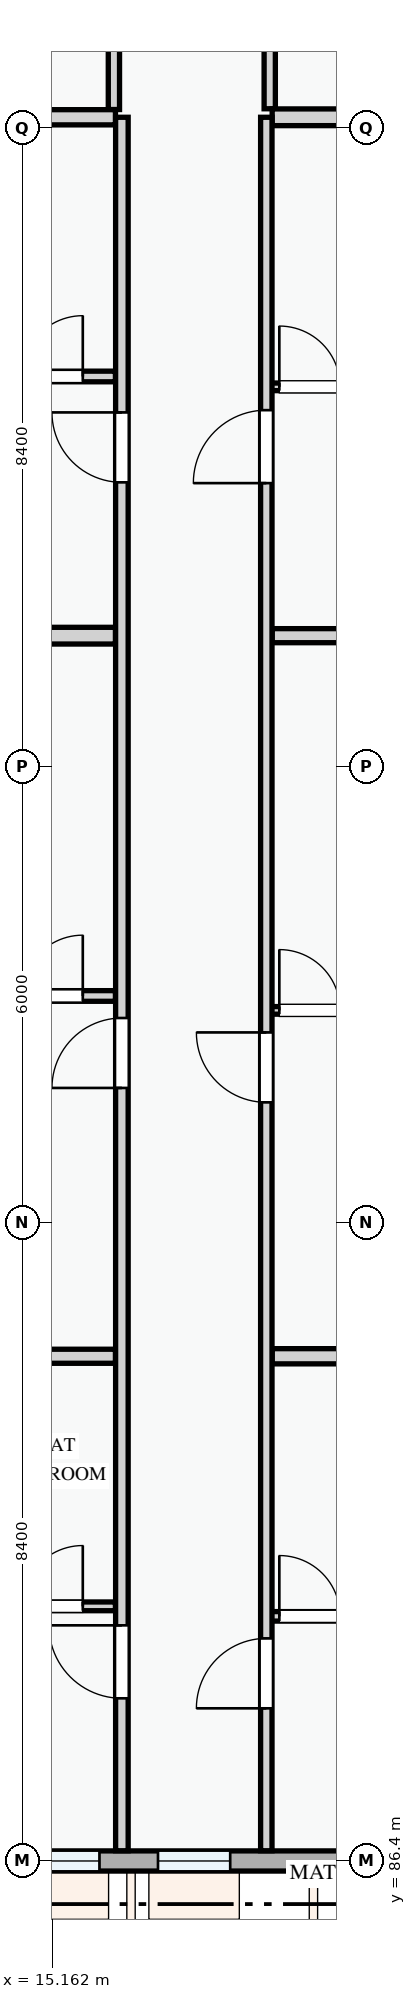
"""IFC4 building model, lengths in metres.
Left out: names, types, materials, properties, quantities, classifications, styles, units other than length and angle.
Written with IfcOpenShell. Run it as: python <this file> out.ifc"""

import sys

from ifc_helpers import new_model, si_unit, direction, frame, frame_2d, origin, place, context, subcontext, project, spatial, rectangle, extrude, element, fill, save


model = new_model("IFC4")
c1 = context("Model", 3, precision=1e-05, world=origin(), true_north=direction((0.0, 1.0)))
c2 = subcontext(c1, "Body", "Model", "MODEL_VIEW")
j1 = project(units=[si_unit("LENGTHUNIT", "METRE"), si_unit("PLANEANGLEUNIT", "RADIAN")], contexts=[c1])
p1 = place(None, origin())
s1 = spatial("IfcSite", under=j1, at=p1, CompositionType="ELEMENT")
p2 = place(p1, origin())
s2 = spatial("IfcBuilding", under=s1, at=p2, CompositionType="ELEMENT")
p3 = place(p2, frame((0.0, 0.0, 34.5)))
s3 = spatial("IfcBuildingStorey", under=s2, at=p3, CompositionType="ELEMENT", Elevation=34.5)
p4 = place(p3, frame((14.4, 86.4, 0.0), z_axis=(0.0, 0.0, 1.0), x_axis=(1.0, 0.0, 0.0)))
e1 = element("IfcWall", 1, at=p4, inside=s3, PredefinedType="STANDARD", context=c2, shape_type="SweptSolid", body=[
    extrude(rectangle(XDim=8.4, YDim=0.265, at=frame_2d((4.2, 0.0))), origin(), (0.0, 0.0, 1.0), 2.375),
])
p5 = place(p4, frame((0.485, 0.0, 0.78)))
e2 = element("IfcOpeningElement", 2, at=p5, cuts=e1, PredefinedType="OPENING", context=c2, shape_type="SweptSolid", body=[
    extrude(rectangle(XDim=0.9, YDim=1.2, at=frame_2d((0.45, 0.6))), frame((0.0, 0.143, 0.0), z_axis=(0.0, -1.0, 0.0), x_axis=(1.0, 0.0, 0.0)), (0.0, 0.0, 1.0), 0.285),
])
p6 = place(p4, frame((2.155, 0.0, 0.78)))
e3 = element("IfcOpeningElement", 3, at=p6, cuts=e1, PredefinedType="OPENING", context=c2, shape_type="SweptSolid", body=[
    extrude(rectangle(XDim=0.95, YDim=1.15, at=frame_2d((0.475, 0.575))), frame((0.0, 0.143, 0.0), z_axis=(0.0, -1.0, 0.0), x_axis=(1.0, 0.0, 0.0)), (0.0, 0.0, 1.0), 0.285),
])
p7 = place(p4, frame((5.185, 0.0, 0.78)))
e4 = element("IfcOpeningElement", 4, at=p7, cuts=e1, PredefinedType="OPENING", context=c2, shape_type="SweptSolid", body=[
    extrude(rectangle(XDim=1.42, YDim=1.38, at=frame_2d((0.71, 0.69))), frame((0.0, 0.143, 0.0), z_axis=(0.0, -1.0, 0.0), x_axis=(1.0, 0.0, 0.0)), (0.0, 0.0, 1.0), 0.285),
])
p8 = place(p3, frame((15.975, 113.324, 0.0), z_axis=(0.0, 0.0, 1.0), x_axis=(0.0, -1.0, 0.0)))
e5 = element("IfcWall", 5, at=p8, inside=s3, PredefinedType="PARTITIONING", context=c2, shape_type="SweptSolid", body=[
    extrude(rectangle(XDim=3.882, YDim=0.148, at=frame_2d((1.941, 0.0))), origin(), (0.0, 0.0, 1.0), 3.0),
])
p9 = place(p3, frame((18.025, 113.324, 0.0), z_axis=(0.0, 0.0, 1.0), x_axis=(0.0, -1.0, 0.0)))
e6 = element("IfcWall", 6, at=p9, inside=s3, PredefinedType="PARTITIONING", context=c2, shape_type="SweptSolid", body=[
    extrude(rectangle(XDim=3.872, YDim=0.148, at=frame_2d((1.936, 0.0))), origin(), (0.0, 0.0, 1.0), 3.0),
])
p10 = place(p3, frame((8.534, 89.75, 0.0), z_axis=(0.0, 0.0, 1.0), x_axis=(1.0, 0.0, 0.0)))
e7 = element("IfcWall", 7, at=p10, inside=s3, PredefinedType="PARTITIONING", context=c2, shape_type="SweptSolid", body=[
    extrude(rectangle(XDim=7.461, YDim=0.115, at=frame_2d((3.73, 0.0))), origin(), (0.0, 0.0, 1.0), 3.0),
])
p11 = place(p10, frame((1.329, 0.0, 0.0)))
e8 = element("IfcOpeningElement", 8, at=p11, cuts=e7, PredefinedType="OPENING", context=c2, shape_type="SweptSolid", body=[
    extrude(rectangle(XDim=0.85, YDim=2.1, at=frame_2d((0.425, 1.05))), frame((0.0, 0.067, 0.0), z_axis=(0.0, -1.0, 0.0), x_axis=(1.0, 0.0, 0.0)), (0.0, 0.0, 1.0), 0.135),
])
p12 = place(p10, frame((4.225, 0.0, 0.0)))
e9 = element("IfcOpeningElement", 9, at=p12, cuts=e7, PredefinedType="OPENING", context=c2, shape_type="SweptSolid", body=[
    extrude(rectangle(XDim=0.85, YDim=2.1, at=frame_2d((0.425, 1.05))), frame((0.0, 0.067, 0.0), z_axis=(0.0, -1.0, 0.0), x_axis=(1.0, 0.0, 0.0)), (0.0, 0.0, 1.0), 0.135),
])
p13 = place(p10, frame((6.231, 0.0, 0.0)))
e10 = element("IfcOpeningElement", 10, at=p13, cuts=e7, PredefinedType="OPENING", context=c2, shape_type="SweptSolid", body=[
    extrude(rectangle(XDim=0.8, YDim=2.1, at=frame_2d((0.4, 1.05))), frame((0.0, 0.067, 0.0), z_axis=(0.0, -1.0, 0.0), x_axis=(1.0, 0.0, 0.0)), (0.0, 0.0, 1.0), 0.135),
])
p14 = place(p3, frame((17.98, 89.618, 0.0), z_axis=(0.0, 0.0, 1.0), x_axis=(1.0, 0.0, 0.0)))
e11 = element("IfcWall", 11, at=p14, inside=s3, PredefinedType="PARTITIONING", context=c2, shape_type="SweptSolid", body=[
    extrude(rectangle(XDim=4.686, YDim=0.125, at=frame_2d((2.343, 0.0))), origin(), (0.0, 0.0, 1.0), 3.0),
])
p15 = place(p14, frame((0.171, 0.0, 0.0)))
e12 = element("IfcOpeningElement", 12, at=p15, cuts=e11, PredefinedType="OPENING", context=c2, shape_type="SweptSolid", body=[
    extrude(rectangle(XDim=0.8, YDim=2.1, at=frame_2d((0.4, 1.05))), frame((0.0, 0.073, 0.0), z_axis=(0.0, -1.0, 0.0), x_axis=(1.0, 0.0, 0.0)), (0.0, 0.0, 1.0), 0.145),
])
p16 = place(p14, frame((1.384, 0.0, 0.0)))
e13 = element("IfcOpeningElement", 13, at=p16, cuts=e11, PredefinedType="OPENING", context=c2, shape_type="SweptSolid", body=[
    extrude(rectangle(XDim=0.85, YDim=2.1, at=frame_2d((0.425, 1.05))), frame((0.0, 0.073, 0.0), z_axis=(0.0, -1.0, 0.0), x_axis=(1.0, 0.0, 0.0)), (0.0, 0.0, 1.0), 0.145),
])
p17 = place(p14, frame((3.193, 0.0, 0.0)))
e14 = element("IfcOpeningElement", 14, at=p17, cuts=e11, PredefinedType="OPENING", context=c2, shape_type="SweptSolid", body=[
    extrude(rectangle(XDim=0.85, YDim=2.1, at=frame_2d((0.425, 1.05))), frame((0.0, 0.073, 0.0), z_axis=(0.0, -1.0, 0.0), x_axis=(1.0, 0.0, 0.0)), (0.0, 0.0, 1.0), 0.145),
])
p18 = place(p3, frame((8.534, 97.78, 0.0), z_axis=(0.0, 0.0, 1.0), x_axis=(1.0, 0.0, 0.0)))
e15 = element("IfcWall", 15, at=p18, inside=s3, PredefinedType="PARTITIONING", context=c2, shape_type="SweptSolid", body=[
    extrude(rectangle(XDim=7.461, YDim=0.14, at=frame_2d((3.73, 0.0))), origin(), (0.0, 0.0, 1.0), 3.0),
])
p19 = place(p18, frame((1.329, 0.0, 0.0)))
e16 = element("IfcOpeningElement", 16, at=p19, cuts=e15, PredefinedType="OPENING", context=c2, shape_type="SweptSolid", body=[
    extrude(rectangle(XDim=0.85, YDim=2.1, at=frame_2d((0.425, 1.05))), frame((0.0, 0.08, 0.0), z_axis=(0.0, -1.0, 0.0), x_axis=(1.0, 0.0, 0.0)), (0.0, 0.0, 1.0), 0.16),
])
p20 = place(p18, frame((4.225, 0.0, 0.0)))
e17 = element("IfcOpeningElement", 17, at=p20, cuts=e15, PredefinedType="OPENING", context=c2, shape_type="SweptSolid", body=[
    extrude(rectangle(XDim=0.82, YDim=2.08, at=frame_2d((0.41, 1.04))), frame((0.0, 0.08, 0.0), z_axis=(0.0, -1.0, 0.0), x_axis=(1.0, 0.0, 0.0)), (0.0, 0.0, 1.0), 0.16),
])
p21 = place(p18, frame((6.231, 0.0, 0.0)))
e18 = element("IfcOpeningElement", 18, at=p21, cuts=e15, PredefinedType="OPENING", context=c2, shape_type="SweptSolid", body=[
    extrude(rectangle(XDim=0.8, YDim=2.1, at=frame_2d((0.4, 1.05))), frame((0.0, 0.08, 0.0), z_axis=(0.0, -1.0, 0.0), x_axis=(1.0, 0.0, 0.0)), (0.0, 0.0, 1.0), 0.16),
])
p22 = place(p3, frame((17.98, 97.59, 0.0), z_axis=(0.0, 0.0, 1.0), x_axis=(1.0, 0.0, 0.0)))
e19 = element("IfcWall", 19, at=p22, inside=s3, PredefinedType="PARTITIONING", context=c2, shape_type="SweptSolid", body=[
    extrude(rectangle(XDim=4.686, YDim=0.1, at=frame_2d((2.343, 0.0))), origin(), (0.0, 0.0, 1.0), 3.0),
])
p23 = place(p22, frame((0.171, 0.0, 0.0)))
e20 = element("IfcOpeningElement", 20, at=p23, cuts=e19, PredefinedType="OPENING", context=c2, shape_type="SweptSolid", body=[
    extrude(rectangle(XDim=0.8, YDim=2.1, at=frame_2d((0.4, 1.05))), frame((0.0, 0.06, 0.0), z_axis=(0.0, -1.0, 0.0), x_axis=(1.0, 0.0, 0.0)), (0.0, 0.0, 1.0), 0.12),
])
p24 = place(p22, frame((1.384, 0.0, 0.0)))
e21 = element("IfcOpeningElement", 21, at=p24, cuts=e19, PredefinedType="OPENING", context=c2, shape_type="SweptSolid", body=[
    extrude(rectangle(XDim=0.85, YDim=2.1, at=frame_2d((0.425, 1.05))), frame((0.0, 0.06, 0.0), z_axis=(0.0, -1.0, 0.0), x_axis=(1.0, 0.0, 0.0)), (0.0, 0.0, 1.0), 0.12),
])
p25 = place(p22, frame((3.193, 0.0, 0.0)))
e22 = element("IfcOpeningElement", 22, at=p25, cuts=e19, PredefinedType="OPENING", context=c2, shape_type="SweptSolid", body=[
    extrude(rectangle(XDim=0.82, YDim=2.08, at=frame_2d((0.41, 1.04))), frame((0.0, 0.06, 0.0), z_axis=(0.0, -1.0, 0.0), x_axis=(1.0, 0.0, 0.0)), (0.0, 0.0, 1.0), 0.12),
])
p26 = place(p3, frame((8.534, 93.04, 0.0), z_axis=(0.0, 0.0, 1.0), x_axis=(1.0, 0.0, 0.0)))
e23 = element("IfcWall", 23, at=p26, inside=s3, PredefinedType="PARTITIONING", context=c2, shape_type="SweptSolid", body=[
    extrude(rectangle(XDim=7.461, YDim=0.185, at=frame_2d((3.73, 0.0))), origin(), (0.0, 0.0, 1.0), 3.0),
])
p27 = place(p3, frame((18.057, 93.04, 0.0), z_axis=(0.0, 0.0, 1.0), x_axis=(1.0, 0.0, 0.0)))
e24 = element("IfcWall", 24, at=p27, inside=s3, PredefinedType="PARTITIONING", context=c2, shape_type="SweptSolid", body=[
    extrude(rectangle(XDim=4.609, YDim=0.2, at=frame_2d((2.304, 0.0))), origin(), (0.0, 0.0, 1.0), 3.0),
])
p28 = place(p3, frame((8.534, 105.93, 0.0), z_axis=(0.0, 0.0, 1.0), x_axis=(1.0, 0.0, 0.0)))
e25 = element("IfcWall", 25, at=p28, inside=s3, PredefinedType="PARTITIONING", context=c2, shape_type="SweptSolid", body=[
    extrude(rectangle(XDim=7.461, YDim=0.14, at=frame_2d((3.73, 0.0))), origin(), (0.0, 0.0, 1.0), 3.0),
])
p29 = place(p28, frame((1.329, 0.0, 0.0)))
e26 = element("IfcOpeningElement", 26, at=p29, cuts=e25, PredefinedType="OPENING", context=c2, shape_type="SweptSolid", body=[
    extrude(rectangle(XDim=0.85, YDim=2.1, at=frame_2d((0.425, 1.05))), frame((0.0, 0.08, 0.0), z_axis=(0.0, -1.0, 0.0), x_axis=(1.0, 0.0, 0.0)), (0.0, 0.0, 1.0), 0.16),
])
p30 = place(p28, frame((4.225, 0.0, 0.0)))
e27 = element("IfcOpeningElement", 27, at=p30, cuts=e25, PredefinedType="OPENING", context=c2, shape_type="SweptSolid", body=[
    extrude(rectangle(XDim=0.85, YDim=2.1, at=frame_2d((0.425, 1.05))), frame((0.0, 0.08, 0.0), z_axis=(0.0, -1.0, 0.0), x_axis=(1.0, 0.0, 0.0)), (0.0, 0.0, 1.0), 0.16),
])
p31 = place(p28, frame((6.231, 0.0, 0.0)))
e28 = element("IfcOpeningElement", 28, at=p31, cuts=e25, PredefinedType="OPENING", context=c2, shape_type="SweptSolid", body=[
    extrude(rectangle(XDim=0.8, YDim=2.1, at=frame_2d((0.4, 1.05))), frame((0.0, 0.08, 0.0), z_axis=(0.0, -1.0, 0.0), x_axis=(1.0, 0.0, 0.0)), (0.0, 0.0, 1.0), 0.16),
])
p32 = place(p3, frame((17.98, 105.794, 0.0), z_axis=(0.0, 0.0, 1.0), x_axis=(1.0, 0.0, 0.0)))
e29 = element("IfcWall", 29, at=p32, inside=s3, PredefinedType="PARTITIONING", context=c2, shape_type="SweptSolid", body=[
    extrude(rectangle(XDim=4.686, YDim=0.1, at=frame_2d((2.343, 0.0))), origin(), (0.0, 0.0, 1.0), 3.0),
])
p33 = place(p32, frame((0.171, 0.0, 0.0)))
e30 = element("IfcOpeningElement", 30, at=p33, cuts=e29, PredefinedType="OPENING", context=c2, shape_type="SweptSolid", body=[
    extrude(rectangle(XDim=0.8, YDim=2.1, at=frame_2d((0.4, 1.05))), frame((0.0, 0.06, 0.0), z_axis=(0.0, -1.0, 0.0), x_axis=(1.0, 0.0, 0.0)), (0.0, 0.0, 1.0), 0.12),
])
p34 = place(p32, frame((1.384, 0.0, 0.0)))
e31 = element("IfcOpeningElement", 31, at=p34, cuts=e29, PredefinedType="OPENING", context=c2, shape_type="SweptSolid", body=[
    extrude(rectangle(XDim=0.85, YDim=2.1, at=frame_2d((0.425, 1.05))), frame((0.0, 0.06, 0.0), z_axis=(0.0, -1.0, 0.0), x_axis=(1.0, 0.0, 0.0)), (0.0, 0.0, 1.0), 0.12),
])
p35 = place(p32, frame((3.193, 0.0, 0.0)))
e32 = element("IfcOpeningElement", 32, at=p35, cuts=e29, PredefinedType="OPENING", context=c2, shape_type="SweptSolid", body=[
    extrude(rectangle(XDim=0.85, YDim=2.1, at=frame_2d((0.425, 1.05))), frame((0.0, 0.06, 0.0), z_axis=(0.0, -1.0, 0.0), x_axis=(1.0, 0.0, 0.0)), (0.0, 0.0, 1.0), 0.12),
])
p36 = place(p3, frame((8.534, 102.52, 0.0), z_axis=(0.0, 0.0, 1.0), x_axis=(1.0, 0.0, 0.0)))
e33 = element("IfcWall", 33, at=p36, inside=s3, PredefinedType="PARTITIONING", context=c2, shape_type="SweptSolid", body=[
    extrude(rectangle(XDim=7.461, YDim=0.22, at=frame_2d((3.73, 0.0))), origin(), (0.0, 0.0, 1.0), 3.0),
])
p37 = place(p3, frame((18.057, 102.52, 0.0), z_axis=(0.0, 0.0, 1.0), x_axis=(1.0, 0.0, 0.0)))
e34 = element("IfcWall", 34, at=p37, inside=s3, PredefinedType="PARTITIONING", context=c2, shape_type="SweptSolid", body=[
    extrude(rectangle(XDim=4.609, YDim=0.185, at=frame_2d((2.304, 0.0))), origin(), (0.0, 0.0, 1.0), 3.0),
])
p38 = place(p3, frame((8.534, 109.34, 0.0), z_axis=(0.0, 0.0, 1.0), x_axis=(1.0, 0.0, 0.0)))
e35 = element("IfcWall", 35, at=p38, inside=s3, PredefinedType="PARTITIONING", context=c2, shape_type="SweptSolid", body=[
    extrude(rectangle(XDim=7.461, YDim=0.2, at=frame_2d((3.73, 0.0))), origin(), (0.0, 0.0, 1.0), 2.375),
])
p39 = place(p3, frame((18.057, 109.34, 0.0), z_axis=(0.0, 0.0, 1.0), x_axis=(1.0, 0.0, 0.0)))
e36 = element("IfcWall", 36, at=p39, inside=s3, PredefinedType="PARTITIONING", context=c2, shape_type="SweptSolid", body=[
    extrude(rectangle(XDim=4.683, YDim=0.22, at=frame_2d((2.342, 0.0))), origin(), (0.0, 0.0, 1.0), 2.375),
])
p40 = place(p3, frame((16.08, 86.534, 0.0), z_axis=(0.0, 0.0, 1.0), x_axis=(0.0, 1.0, 0.0)))
e37 = element("IfcWall", 37, at=p40, inside=s3, PredefinedType="PARTITIONING", context=c2, shape_type="SweptSolid", body=[
    extrude(rectangle(XDim=22.806, YDim=0.165, at=frame_2d((11.403, 0.0))), origin(), (0.0, 0.0, 1.0), 3.0),
])
p41 = place(p40, frame((2.006, 0.0, 0.0)))
e38 = element("IfcOpeningElement", 38, at=p41, cuts=e37, PredefinedType="OPENING", context=c2, shape_type="SweptSolid", body=[
    extrude(rectangle(XDim=0.96, YDim=2.12, at=frame_2d((0.48, 1.06))), frame((0.0, 0.093, 0.0), z_axis=(0.0, -1.0, 0.0), x_axis=(1.0, 0.0, 0.0)), (0.0, 0.0, 1.0), 0.185),
])
p42 = place(p40, frame((10.035, 0.0, 0.0)))
e39 = element("IfcOpeningElement", 39, at=p42, cuts=e37, PredefinedType="OPENING", context=c2, shape_type="SweptSolid", body=[
    extrude(rectangle(XDim=0.92, YDim=2.1, at=frame_2d((0.46, 1.05))), frame((0.0, 0.093, 0.0), z_axis=(0.0, -1.0, 0.0), x_axis=(1.0, 0.0, 0.0)), (0.0, 0.0, 1.0), 0.185),
])
p43 = place(p40, frame((18.003, 0.0, 0.0)))
e40 = element("IfcOpeningElement", 40, at=p43, cuts=e37, PredefinedType="OPENING", context=c2, shape_type="SweptSolid", body=[
    extrude(rectangle(XDim=0.92, YDim=2.1, at=frame_2d((0.46, 1.05))), frame((0.0, 0.093, 0.0), z_axis=(0.0, -1.0, 0.0), x_axis=(1.0, 0.0, 0.0)), (0.0, 0.0, 1.0), 0.185),
])
p44 = place(p3, frame((17.98, 86.534, 0.0), z_axis=(0.0, 0.0, 1.0), x_axis=(0.0, 1.0, 0.0)))
e41 = element("IfcWall", 41, at=p44, inside=s3, PredefinedType="PARTITIONING", context=c2, shape_type="SweptSolid", body=[
    extrude(rectangle(XDim=22.806, YDim=0.15, at=frame_2d((11.403, 0.0))), origin(), (0.0, 0.0, 1.0), 3.0),
])
p45 = place(p44, frame((1.874, 0.0, 0.0)))
e42 = element("IfcOpeningElement", 42, at=p45, cuts=e41, PredefinedType="OPENING", context=c2, shape_type="SweptSolid", body=[
    extrude(rectangle(XDim=0.92, YDim=2.1, at=frame_2d((0.46, 1.05))), frame((0.0, 0.085, 0.0), z_axis=(0.0, -1.0, 0.0), x_axis=(1.0, 0.0, 0.0)), (0.0, 0.0, 1.0), 0.17),
])
p46 = place(p44, frame((9.846, 0.0, 0.0)))
e43 = element("IfcOpeningElement", 43, at=p46, cuts=e41, PredefinedType="OPENING", context=c2, shape_type="SweptSolid", body=[
    extrude(rectangle(XDim=0.92, YDim=2.1, at=frame_2d((0.46, 1.05))), frame((0.0, 0.085, 0.0), z_axis=(0.0, -1.0, 0.0), x_axis=(1.0, 0.0, 0.0)), (0.0, 0.0, 1.0), 0.17),
])
p47 = place(p44, frame((17.992, 0.0, 0.0)))
e44 = element("IfcOpeningElement", 44, at=p47, cuts=e41, PredefinedType="OPENING", context=c2, shape_type="SweptSolid", body=[
    extrude(rectangle(XDim=0.96, YDim=2.12, at=frame_2d((0.48, 1.06))), frame((0.0, 0.085, 0.0), z_axis=(0.0, -1.0, 0.0), x_axis=(1.0, 0.0, 0.0)), (0.0, 0.0, 1.0), 0.17),
])
p48 = place(p5, origin())
e45 = element("IfcWindow", 45, at=p48, inside=s3, PartitioningType="SINGLE_PANEL", PredefinedType="WINDOW", context=c2, shape_type="SweptSolid", body=[
    extrude(rectangle(XDim=0.9, YDim=1.2, at=frame_2d((0.45, 0.6))), frame((0.0, 0.03, 0.0), z_axis=(0.0, -1.0, 0.0), x_axis=(1.0, 0.0, 0.0)), (0.0, 0.0, 1.0), 0.06),
])
fill(e2, e45)
p49 = place(p6, origin())
e46 = element("IfcWindow", 46, at=p49, inside=s3, PartitioningType="SINGLE_PANEL", PredefinedType="WINDOW", context=c2, shape_type="SweptSolid", body=[
    extrude(rectangle(XDim=0.95, YDim=1.15, at=frame_2d((0.475, 0.575))), frame((0.0, 0.03, 0.0), z_axis=(0.0, -1.0, 0.0), x_axis=(1.0, 0.0, 0.0)), (0.0, 0.0, 1.0), 0.06),
])
fill(e3, e46)
p50 = place(p13, origin())
e47 = element("IfcDoor", 47, at=p50, inside=s3, OperationType="SINGLE_SWING_RIGHT", PredefinedType="DOOR", context=c2, shape_type="SweptSolid", body=[
    extrude(rectangle(XDim=0.8, YDim=2.1, at=frame_2d((0.4, 1.05))), frame((0.0, 0.025, 0.0), z_axis=(0.0, -1.0, 0.0), x_axis=(1.0, 0.0, 0.0)), (0.0, 0.0, 1.0), 0.05),
])
fill(e10, e47)
p51 = place(p15, origin())
e48 = element("IfcDoor", 48, at=p51, inside=s3, OperationType="SINGLE_SWING_LEFT", PredefinedType="DOOR", context=c2, shape_type="SweptSolid", body=[
    extrude(rectangle(XDim=0.8, YDim=2.1, at=frame_2d((0.4, 1.05))), frame((0.0, 0.025, 0.0), z_axis=(0.0, -1.0, 0.0), x_axis=(1.0, 0.0, 0.0)), (0.0, 0.0, 1.0), 0.05),
])
fill(e12, e48)
p52 = place(p21, origin())
e49 = element("IfcDoor", 49, at=p52, inside=s3, OperationType="SINGLE_SWING_RIGHT", PredefinedType="DOOR", context=c2, shape_type="SweptSolid", body=[
    extrude(rectangle(XDim=0.8, YDim=2.1, at=frame_2d((0.4, 1.05))), frame((0.0, 0.025, 0.0), z_axis=(0.0, -1.0, 0.0), x_axis=(1.0, 0.0, 0.0)), (0.0, 0.0, 1.0), 0.05),
])
fill(e18, e49)
p53 = place(p23, origin())
e50 = element("IfcDoor", 50, at=p53, inside=s3, OperationType="SINGLE_SWING_LEFT", PredefinedType="DOOR", context=c2, shape_type="SweptSolid", body=[
    extrude(rectangle(XDim=0.8, YDim=2.1, at=frame_2d((0.4, 1.05))), frame((0.0, 0.025, 0.0), z_axis=(0.0, -1.0, 0.0), x_axis=(1.0, 0.0, 0.0)), (0.0, 0.0, 1.0), 0.05),
])
fill(e20, e50)
p54 = place(p31, origin())
e51 = element("IfcDoor", 51, at=p54, inside=s3, OperationType="SINGLE_SWING_RIGHT", PredefinedType="DOOR", context=c2, shape_type="SweptSolid", body=[
    extrude(rectangle(XDim=0.8, YDim=2.1, at=frame_2d((0.4, 1.05))), frame((0.0, 0.025, 0.0), z_axis=(0.0, -1.0, 0.0), x_axis=(1.0, 0.0, 0.0)), (0.0, 0.0, 1.0), 0.05),
])
fill(e28, e51)
p55 = place(p33, origin())
e52 = element("IfcDoor", 52, at=p55, inside=s3, OperationType="SINGLE_SWING_LEFT", PredefinedType="DOOR", context=c2, shape_type="SweptSolid", body=[
    extrude(rectangle(XDim=0.8, YDim=2.1, at=frame_2d((0.4, 1.05))), frame((0.0, 0.025, 0.0), z_axis=(0.0, -1.0, 0.0), x_axis=(1.0, 0.0, 0.0)), (0.0, 0.0, 1.0), 0.05),
])
fill(e30, e52)
p56 = place(p41, origin())
e53 = element("IfcDoor", 53, at=p56, inside=s3, OperationType="SINGLE_SWING_RIGHT", PredefinedType="DOOR", context=c2, shape_type="SweptSolid", body=[
    extrude(rectangle(XDim=0.96, YDim=2.12, at=frame_2d((0.48, 1.06))), frame((0.0, 0.025, 0.0), z_axis=(0.0, -1.0, 0.0), x_axis=(1.0, 0.0, 0.0)), (0.0, 0.0, 1.0), 0.05),
])
fill(e38, e53)
p57 = place(p42, origin())
e54 = element("IfcDoor", 54, at=p57, inside=s3, OperationType="SINGLE_SWING_LEFT", PredefinedType="DOOR", context=c2, shape_type="SweptSolid", body=[
    extrude(rectangle(XDim=0.92, YDim=2.1, at=frame_2d((0.46, 1.05))), frame((0.0, 0.025, 0.0), z_axis=(0.0, -1.0, 0.0), x_axis=(1.0, 0.0, 0.0)), (0.0, 0.0, 1.0), 0.05),
])
fill(e39, e54)
p58 = place(p43, origin())
e55 = element("IfcDoor", 55, at=p58, inside=s3, OperationType="SINGLE_SWING_RIGHT", PredefinedType="DOOR", context=c2, shape_type="SweptSolid", body=[
    extrude(rectangle(XDim=0.92, YDim=2.1, at=frame_2d((0.46, 1.05))), frame((0.0, 0.025, 0.0), z_axis=(0.0, -1.0, 0.0), x_axis=(1.0, 0.0, 0.0)), (0.0, 0.0, 1.0), 0.05),
])
fill(e40, e55)
p59 = place(p45, origin())
e56 = element("IfcDoor", 56, at=p59, inside=s3, OperationType="SINGLE_SWING_LEFT", PredefinedType="DOOR", context=c2, shape_type="SweptSolid", body=[
    extrude(rectangle(XDim=0.92, YDim=2.1, at=frame_2d((0.46, 1.05))), frame((0.0, 0.025, 0.0), z_axis=(0.0, -1.0, 0.0), x_axis=(1.0, 0.0, 0.0)), (0.0, 0.0, 1.0), 0.05),
])
fill(e42, e56)
p60 = place(p46, origin())
e57 = element("IfcDoor", 57, at=p60, inside=s3, OperationType="SINGLE_SWING_RIGHT", PredefinedType="DOOR", context=c2, shape_type="SweptSolid", body=[
    extrude(rectangle(XDim=0.92, YDim=2.1, at=frame_2d((0.46, 1.05))), frame((0.0, 0.025, 0.0), z_axis=(0.0, -1.0, 0.0), x_axis=(1.0, 0.0, 0.0)), (0.0, 0.0, 1.0), 0.05),
])
fill(e43, e57)
p61 = place(p47, origin())
e58 = element("IfcDoor", 58, at=p61, inside=s3, OperationType="SINGLE_SWING_LEFT", PredefinedType="DOOR", context=c2, shape_type="SweptSolid", body=[
    extrude(rectangle(XDim=0.96, YDim=2.12, at=frame_2d((0.48, 1.06))), frame((0.0, 0.025, 0.0), z_axis=(0.0, -1.0, 0.0), x_axis=(1.0, 0.0, 0.0)), (0.0, 0.0, 1.0), 0.05),
])
fill(e44, e58)
save(model, sys.argv[1])
